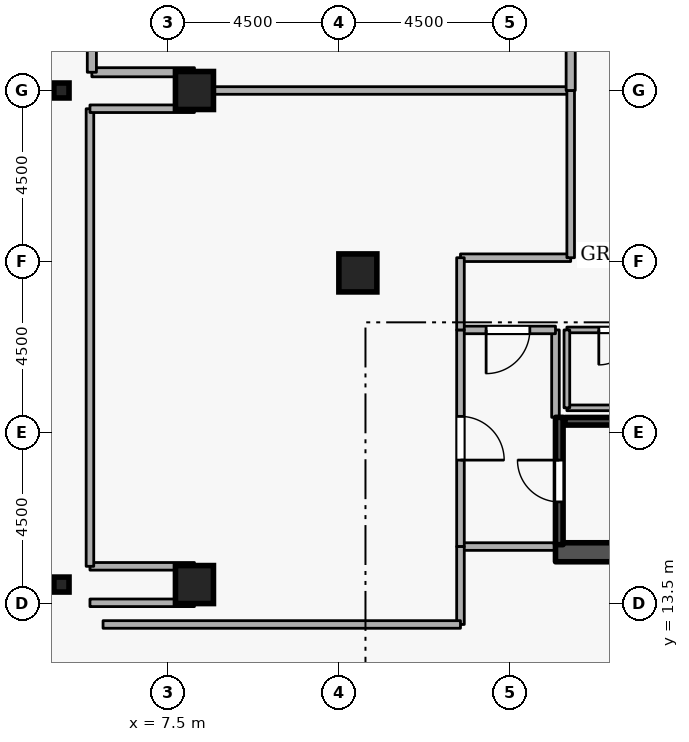
"""IFC4 building model, lengths in metres.
Left out: names, types, materials, properties, quantities, classifications, styles, units other than length and angle.
Written with IfcOpenShell. Run it as: python <this file> out.ifc"""

import sys

from ifc_helpers import new_model, si_unit, direction, frame, frame_2d, origin, origin_2d, place, context, subcontext, project, spatial, rectangle, i_section, extrude, element, fill, save


model = new_model("IFC4")
c1 = context("Model", 3, precision=1e-05, world=origin(), true_north=direction((0.0, 1.0)))
c2 = subcontext(c1, "Body", "Model", "MODEL_VIEW")
j1 = project(units=[si_unit("LENGTHUNIT", "METRE"), si_unit("PLANEANGLEUNIT", "RADIAN")], contexts=[c1])
p1 = place(None, origin())
s1 = spatial("IfcSite", under=j1, at=p1, CompositionType="ELEMENT")
p2 = place(p1, origin())
s2 = spatial("IfcBuilding", under=s1, at=p2, CompositionType="ELEMENT")
p3 = place(p2, frame((0.0, 0.0, 221.7)))
s3 = spatial("IfcBuildingStorey", under=s2, at=p3, CompositionType="ELEMENT", Elevation=221.7)
p4 = place(p3, frame((17.7, 14.85, 0.0), z_axis=(0.0, 0.0, 1.0), x_axis=(1.0, 0.0, 0.0)))
e1 = element("IfcWall", 1, at=p4, inside=s3, PredefinedType="SHEAR", context=c2, shape_type="SweptSolid", body=[
    extrude(rectangle(XDim=15.6, YDim=0.5, at=frame_2d((7.8, 0.0))), origin(), (0.0, 0.0, 1.0), 4.2),
])
for number, where, z_axis, x_axis in (
    (2, (8.2, 14.0, 0.0), (0.0, 0.0, 1.0), (1.0, 0.0, 0.0)),
    (3, (8.2, 27.0, 0.0), (0.0, 0.0, 1.0), (1.0, 0.0, 0.0)),
    (4, (12.5, 22.2, 0.0), (0.0, 0.0, 1.0), (1.0, 0.0, 0.0)),
):
    element("IfcColumn", number, at=place(p3, frame(where, z_axis=z_axis, x_axis=x_axis)), inside=s3, PredefinedType="COLUMN", context=c2, shape_type="SweptSolid", body=[
        extrude(rectangle(XDim=1.0, YDim=1.0, at=origin_2d()), origin(), (0.0, 0.0, 1.0), 4.2),
    ])
for number, where, z_axis, x_axis in (
    (5, (4.7, 14.0, 0.0), (0.0, 0.0, 1.0), (1.0, 0.0, 0.0)),
    (6, (4.7, 27.0, 0.0), (0.0, 0.0, 1.0), (1.0, 0.0, 0.0)),
):
    element("IfcColumn", number, at=place(p3, frame(where, z_axis=z_axis, x_axis=x_axis)), inside=s3, PredefinedType="COLUMN", context=c2, shape_type="SweptSolid", body=[
        extrude(i_section(OverallWidth=0.399, OverallDepth=0.394, WebThickness=0.023, FlangeThickness=0.037, FilletRadius=0.015, at=origin_2d()), origin(), (0.0, 0.0, 1.0), 4.2),
    ])
p5 = place(p3, frame((17.8, 15.05, 0.0), z_axis=(0.0, 0.0, 1.0), x_axis=(0.0, 1.0, 0.0)))
e7 = element("IfcWall", 7, at=p5, inside=s3, PredefinedType="SHEAR", context=c2, shape_type="SweptSolid", body=[
    extrude(rectangle(XDim=3.35, YDim=0.2, at=frame_2d((1.675, 0.0))), origin(), (0.0, 0.0, 1.0), 4.2),
])
p6 = place(p5, frame((1.125, 0.0, 0.0)))
e8 = element("IfcOpeningElement", 8, at=p6, cuts=e7, PredefinedType="OPENING", context=c2, shape_type="SweptSolid", body=[
    extrude(rectangle(XDim=1.1, YDim=2.1, at=frame_2d((0.55, 1.05))), frame((0.0, 0.11, 0.0), z_axis=(0.0, -1.0, 0.0), x_axis=(1.0, 0.0, 0.0)), (0.0, 0.0, 1.0), 0.22),
])
p7 = place(p3, frame((25.05, 18.297, 0.0), z_axis=(0.0, 0.0, 1.0), x_axis=(-1.0, 0.0, 0.0)))
e9 = element("IfcWall", 9, at=p7, inside=s3, PredefinedType="SHEAR", context=c2, shape_type="SweptSolid", body=[
    extrude(rectangle(XDim=7.1, YDim=0.2, at=frame_2d((3.55, 0.0))), origin(), (0.0, 0.0, 1.0), 4.2),
])
p8 = place(p3, frame((15.2, 15.0, 0.0), z_axis=(0.0, 0.0, 1.0), x_axis=(1.0, 0.0, 0.0)))
e10 = element("IfcWall", 10, at=p8, inside=s3, PredefinedType="STANDARD", context=c2, shape_type="SweptSolid", body=[
    extrude(rectangle(XDim=2.5, YDim=0.2, at=frame_2d((1.25, 0.0))), origin(), (0.0, 0.0, 1.0), 3.94),
])
p9 = place(p3, frame((17.7, 18.4, 0.0), z_axis=(0.0, 0.0, 1.0), x_axis=(0.0, 1.0, 0.0)))
e11 = element("IfcWall", 11, at=p9, inside=s3, PredefinedType="STANDARD", context=c2, shape_type="SweptSolid", body=[
    extrude(rectangle(XDim=2.3, YDim=0.2, at=frame_2d((1.15, 0.0))), origin(), (0.0, 0.0, 1.0), 3.145),
])
p10 = place(p3, frame((17.7, 20.7, 0.0), z_axis=(0.0, 0.0, 1.0), x_axis=(-1.0, 0.0, 0.0)))
e12 = element("IfcWall", 12, at=p10, inside=s3, PredefinedType="STANDARD", context=c2, shape_type="SweptSolid", body=[
    extrude(rectangle(XDim=2.5, YDim=0.2, at=frame_2d((1.25, 0.0))), origin(), (0.0, 0.0, 1.0), 3.94),
])
p11 = place(p10, frame((0.675, 0.0, 0.0)))
e13 = element("IfcOpeningElement", 13, at=p11, cuts=e12, PredefinedType="OPENING", context=c2, shape_type="SweptSolid", body=[
    extrude(rectangle(XDim=1.15, YDim=2.1, at=frame_2d((0.575, 1.05))), frame((0.0, 0.11, 0.0), z_axis=(0.0, -1.0, 0.0), x_axis=(1.0, 0.0, 0.0)), (0.0, 0.0, 1.0), 0.22),
])
p12 = place(p3, frame((15.2, 20.7, 0.0), z_axis=(0.0, 0.0, 1.0), x_axis=(0.0, -1.0, 0.0)))
e14 = element("IfcWall", 14, at=p12, inside=s3, PredefinedType="STANDARD", context=c2, shape_type="SweptSolid", body=[
    extrude(rectangle(XDim=5.7, YDim=0.2, at=frame_2d((2.85, 0.0))), origin(), (0.0, 0.0, 1.0), 3.94),
])
p13 = place(p12, frame((2.275, 0.0, 0.0)))
e15 = element("IfcOpeningElement", 15, at=p13, cuts=e14, PredefinedType="OPENING", context=c2, shape_type="SweptSolid", body=[
    extrude(rectangle(XDim=1.15, YDim=2.1, at=frame_2d((0.575, 1.05))), frame((0.0, 0.11, 0.0), z_axis=(0.0, -1.0, 0.0), x_axis=(1.0, 0.0, 0.0)), (0.0, 0.0, 1.0), 0.22),
])
p14 = place(p3, frame((18.1, 22.6, 0.0), z_axis=(0.0, 0.0, 1.0), x_axis=(-1.0, 0.0, 0.0)))
e16 = element("IfcWall", 16, at=p14, inside=s3, PredefinedType="STANDARD", context=c2, shape_type="SweptSolid", body=[
    extrude(rectangle(XDim=2.9, YDim=0.2, at=frame_2d((1.45, 0.0))), origin(), (0.0, 0.0, 1.0), 3.94),
])
p15 = place(p3, frame((15.2, 22.6, 0.0), z_axis=(0.0, 0.0, 1.0), x_axis=(0.0, -1.0, 0.0)))
e17 = element("IfcWall", 17, at=p15, inside=s3, PredefinedType="STANDARD", context=c2, shape_type="SweptSolid", body=[
    extrude(rectangle(XDim=1.9, YDim=0.2, at=frame_2d((0.95, 0.0))), origin(), (0.0, 0.0, 1.0), 3.94),
])
p16 = place(p3, frame((15.2, 15.0, 0.0), z_axis=(0.0, 0.0, 1.0), x_axis=(0.0, -1.0, 0.0)))
e18 = element("IfcWall", 18, at=p16, inside=s3, PredefinedType="STANDARD", context=c2, shape_type="SweptSolid", body=[
    extrude(rectangle(XDim=2.05, YDim=0.2, at=frame_2d((1.025, 0.0))), origin(), (0.0, 0.0, 1.0), 3.94),
])
p17 = place(p3, frame((15.2, 12.95, 0.0), z_axis=(0.0, 0.0, 1.0), x_axis=(-1.0, 0.0, 0.0)))
e19 = element("IfcWall", 19, at=p17, inside=s3, PredefinedType="STANDARD", context=c2, shape_type="SweptSolid", body=[
    extrude(rectangle(XDim=9.405, YDim=0.2, at=frame_2d((4.703, 0.0))), origin(), (0.0, 0.0, 1.0), 3.94),
])
for number, where, z_axis, x_axis in (
    (20, (5.45, 13.52, 0.0), (0.0, 0.0, 1.0), (1.0, 0.0, 0.0)),
    (21, (8.2, 14.48, 0.0), (0.0, 0.0, 1.0), (-1.0, 0.0, 0.0)),
):
    element("IfcWall", number, at=place(p3, frame(where, z_axis=z_axis, x_axis=x_axis)), inside=s3, PredefinedType="STANDARD", context=c2, shape_type="SweptSolid", body=[
        extrude(rectangle(XDim=2.75, YDim=0.2, at=frame_2d((1.375, 0.0))), origin(), (0.0, 0.0, 1.0), 3.94),
    ])
p18 = place(p3, frame((5.45, 14.48, 0.0), z_axis=(0.0, 0.0, 1.0), x_axis=(0.0, 1.0, 0.0)))
e22 = element("IfcWall", 22, at=p18, inside=s3, PredefinedType="STANDARD", context=c2, shape_type="SweptSolid", body=[
    extrude(rectangle(XDim=12.04, YDim=0.2, at=frame_2d((6.02, 0.0))), origin(), (0.0, 0.0, 1.0), 3.94),
])
p19 = place(p3, frame((5.45, 26.52, 0.0), z_axis=(0.0, 0.0, 1.0), x_axis=(1.0, 0.0, 0.0)))
e23 = element("IfcWall", 23, at=p19, inside=s3, PredefinedType="STANDARD", context=c2, shape_type="SweptSolid", body=[
    extrude(rectangle(XDim=2.75, YDim=0.2, at=frame_2d((1.375, 0.0))), origin(), (0.0, 0.0, 1.0), 3.94),
])
p20 = place(p3, frame((8.2, 27.0, 0.0), z_axis=(0.0, 0.0, 1.0), x_axis=(1.0, 0.0, 0.0)))
e24 = element("IfcWall", 24, at=p20, inside=s3, PredefinedType="STANDARD", context=c2, shape_type="SweptSolid", body=[
    extrude(rectangle(XDim=9.9, YDim=0.2, at=frame_2d((4.95, 0.0))), origin(), (0.0, 0.0, 1.0), 3.325),
])
p21 = place(p3, frame((18.1, 27.0, 0.0), z_axis=(0.0, 0.0, 1.0), x_axis=(0.0, -1.0, 0.0)))
e25 = element("IfcWall", 25, at=p21, inside=s3, PredefinedType="STANDARD", context=c2, shape_type="SweptSolid", body=[
    extrude(rectangle(XDim=4.4, YDim=0.2, at=frame_2d((2.2, 0.0))), origin(), (0.0, 0.0, 1.0), 3.145),
])
p22 = place(p3, frame((18.1, 31.4, 0.0), z_axis=(0.0, 0.0, 1.0), x_axis=(0.0, -1.0, 0.0)))
e26 = element("IfcWall", 26, at=p22, inside=s3, PredefinedType="STANDARD", context=c2, shape_type="SweptSolid", body=[
    extrude(rectangle(XDim=4.4, YDim=0.24, at=frame_2d((2.2, 0.0))), origin(), (0.0, 0.0, 1.0), 3.145),
])
p23 = place(p22, frame((1.6, 0.0, 0.0)))
e27 = element("IfcOpeningElement", 27, at=p23, cuts=e26, PredefinedType="OPENING", context=c2, shape_type="SweptSolid", body=[
    extrude(rectangle(XDim=1.2, YDim=2.1, at=frame_2d((0.6, 1.05))), frame((0.0, 0.13, 0.0), z_axis=(0.0, -1.0, 0.0), x_axis=(1.0, 0.0, 0.0)), (0.0, 0.0, 1.0), 0.26),
])
p24 = place(p3, frame((8.2, 27.48, 0.0), z_axis=(0.0, 0.0, 1.0), x_axis=(-1.0, 0.0, 0.0)))
e28 = element("IfcWall", 28, at=p24, inside=s3, PredefinedType="STANDARD", context=c2, shape_type="SweptSolid", body=[
    extrude(rectangle(XDim=2.7, YDim=0.24, at=frame_2d((1.35, 0.0))), origin(), (0.0, 0.0, 1.0), 3.94),
])
p25 = place(p3, frame((5.5, 27.48, 0.0), z_axis=(0.0, 0.0, 1.0), x_axis=(0.0, 1.0, 0.0)))
e29 = element("IfcWall", 29, at=p25, inside=s3, PredefinedType="STANDARD", context=c2, shape_type="SweptSolid", body=[
    extrude(rectangle(XDim=3.92, YDim=0.24, at=frame_2d((1.96, 0.0))), origin(), (0.0, 0.0, 1.0), 3.94),
])
p26 = place(p3, frame((18.0, 18.65, 0.0), z_axis=(0.0, 0.0, 1.0), x_axis=(1.0, 0.0, 0.0)))
e30 = element("IfcWall", 30, at=p26, inside=s3, PredefinedType="PARTITIONING", context=c2, shape_type="SweptSolid", body=[
    extrude(rectangle(XDim=2.6, YDim=0.15, at=frame_2d((1.3, 0.0))), origin(), (0.0, 0.0, 1.0), 3.94),
])
p27 = place(p3, frame((20.6, 20.7, 0.0), z_axis=(0.0, 0.0, 1.0), x_axis=(-1.0, 0.0, 0.0)))
e31 = element("IfcWall", 31, at=p27, inside=s3, PredefinedType="PARTITIONING", context=c2, shape_type="SweptSolid", body=[
    extrude(rectangle(XDim=2.6, YDim=0.15, at=frame_2d((1.3, 0.0))), origin(), (0.0, 0.0, 1.0), 3.94),
])
p28 = place(p27, frame((0.84, 0.0, 0.0)))
e32 = element("IfcOpeningElement", 32, at=p28, cuts=e31, PredefinedType="OPENING", context=c2, shape_type="SweptSolid", body=[
    extrude(rectangle(XDim=0.92, YDim=2.08, at=frame_2d((0.46, 1.04))), frame((0.0, 0.085, 0.0), z_axis=(0.0, -1.0, 0.0), x_axis=(1.0, 0.0, 0.0)), (0.0, 0.0, 1.0), 0.17),
])
p29 = place(p3, frame((18.0, 20.7, 0.0), z_axis=(0.0, 0.0, 1.0), x_axis=(0.0, -1.0, 0.0)))
e33 = element("IfcWall", 33, at=p29, inside=s3, PredefinedType="PARTITIONING", context=c2, shape_type="SweptSolid", body=[
    extrude(rectangle(XDim=2.05, YDim=0.15, at=frame_2d((1.025, 0.0))), origin(), (0.0, 0.0, 1.0), 3.145),
])
p30 = place(p6, origin())
e34 = element("IfcDoor", 34, at=p30, inside=s3, OperationType="SINGLE_SWING_RIGHT", PredefinedType="DOOR", context=c2, shape_type="SweptSolid", body=[
    extrude(rectangle(XDim=1.1, YDim=2.1, at=frame_2d((0.55, 1.05))), frame((0.0, 0.025, 0.0), z_axis=(0.0, -1.0, 0.0), x_axis=(1.0, 0.0, 0.0)), (0.0, 0.0, 1.0), 0.05),
])
fill(e8, e34)
p31 = place(p11, origin())
e35 = element("IfcDoor", 35, at=p31, inside=s3, OperationType="SINGLE_SWING_RIGHT", PredefinedType="DOOR", context=c2, shape_type="SweptSolid", body=[
    extrude(rectangle(XDim=1.15, YDim=2.1, at=frame_2d((0.575, 1.05))), frame((0.0, 0.025, 0.0), z_axis=(0.0, -1.0, 0.0), x_axis=(1.0, 0.0, 0.0)), (0.0, 0.0, 1.0), 0.05),
])
fill(e13, e35)
p32 = place(p28, origin())
e36 = element("IfcDoor", 36, at=p32, inside=s3, OperationType="SINGLE_SWING_RIGHT", PredefinedType="DOOR", context=c2, shape_type="SweptSolid", body=[
    extrude(rectangle(XDim=0.92, YDim=2.08, at=frame_2d((0.46, 1.04))), frame((0.0, 0.025, 0.0), z_axis=(0.0, -1.0, 0.0), x_axis=(1.0, 0.0, 0.0)), (0.0, 0.0, 1.0), 0.05),
])
fill(e32, e36)
p33 = place(p13, origin())
e37 = element("IfcDoor", 37, at=p33, inside=s3, OperationType="SINGLE_SWING_RIGHT", PredefinedType="DOOR", context=c2, shape_type="SweptSolid", body=[
    extrude(rectangle(XDim=1.15, YDim=2.1, at=frame_2d((0.575, 1.05))), frame((0.0, 0.025, 0.0), z_axis=(0.0, -1.0, 0.0), x_axis=(1.0, 0.0, 0.0)), (0.0, 0.0, 1.0), 0.05),
])
fill(e15, e37)
save(model, sys.argv[1])
